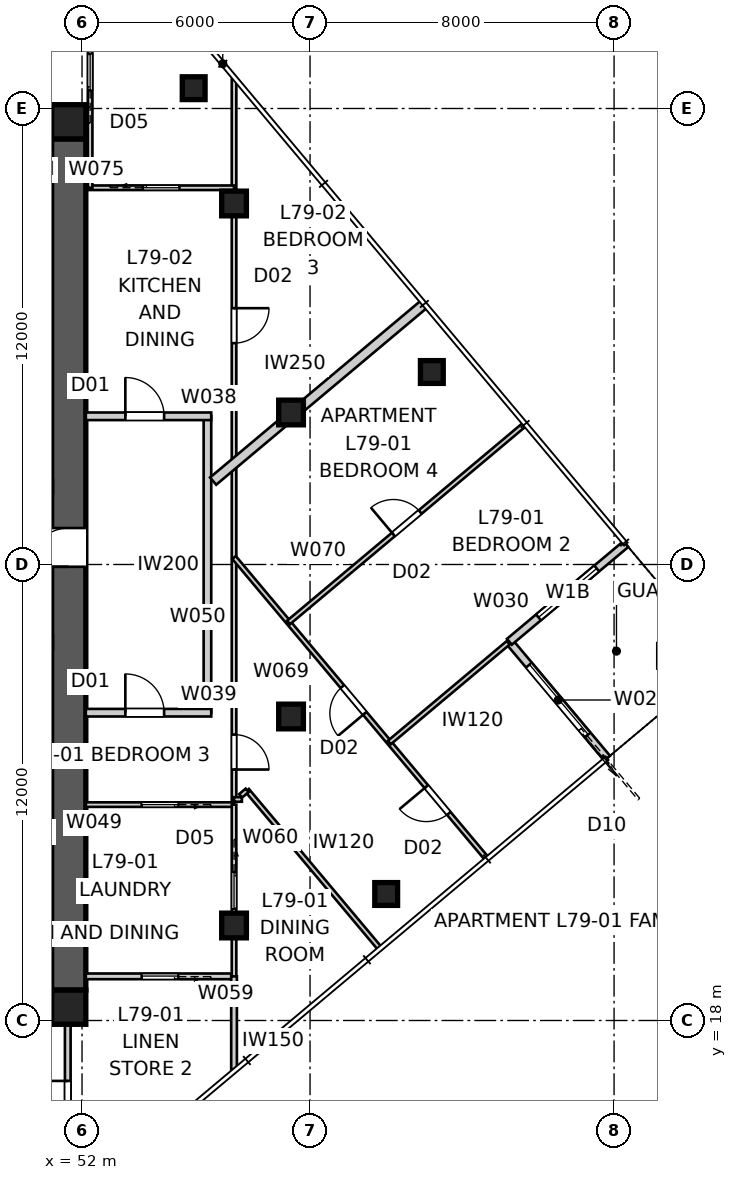
"""IFC4 building model, lengths in metres.
Left out: names, types, materials, properties, quantities, classifications, styles, units other than length and angle.
Written with IfcOpenShell. Run it as: python <this file> out.ifc"""

import sys

from ifc_helpers import new_model, si_unit, direction, frame, frame_2d, origin, origin_2d, place, context, subcontext, project, spatial, polyline, rectangle, outline, extrude, element, fill, save


model = new_model("IFC4")
c1 = context("Model", 3, precision=1e-05, world=origin(), true_north=direction((0.0, 1.0)))
c2 = subcontext(c1, "Body", "Model", "MODEL_VIEW")
j1 = project(units=[si_unit("LENGTHUNIT", "METRE"), si_unit("PLANEANGLEUNIT", "RADIAN")], contexts=[c1])
p1 = place(None, origin())
s1 = spatial("IfcSite", under=j1, at=p1, CompositionType="ELEMENT")
p2 = place(p1, origin())
s2 = spatial("IfcBuilding", under=s1, at=p2, CompositionType="ELEMENT")
p3 = place(p2, frame((0.0, 0.0, 286.2)))
s3 = spatial("IfcBuildingStorey", under=s2, at=p3, CompositionType="ELEMENT", Elevation=286.2)
for number, where, z_axis, x_axis in (
    (1, (28.8, 41.65, 0.0), (0.0, 0.0, 1.0), (1.0, 0.0, 0.0)),
    (2, (51.2, 18.35, 0.0), (0.0, 0.0, 1.0), (-1.0, 0.0, 0.0)),
):
    element("IfcWall", number, at=place(p3, frame(where, z_axis=z_axis, x_axis=x_axis)), inside=s3, PredefinedType="SHEAR", context=c2, shape_type="SweptSolid", body=[
        extrude(outline(polyline([(0.0, -0.45), (22.4, -0.45), (22.4, -0.025), (22.85, -0.025), (22.85, 0.025), (22.4, 0.025), (22.4, 0.45), (0.0, 0.45), (0.0, 0.025), (-0.45, 0.025), (-0.45, -0.025), (0.0, -0.025), (0.0, -0.45)])), origin(), (0.0, 0.0, 1.0), 3.4),
    ])
p4 = place(p3, frame((51.65, 18.8, 0.0), z_axis=(0.0, 0.0, 1.0), x_axis=(0.0, 1.0, 0.0)))
e3 = element("IfcWall", 3, at=p4, inside=s3, PredefinedType="SHEAR", context=c2, shape_type="SweptSolid", body=[
    extrude(outline(polyline([(0.0, -0.45), (22.4, -0.45), (22.4, -0.025), (22.85, -0.025), (22.85, 0.025), (22.4, 0.025), (22.4, 0.45), (0.0, 0.45), (0.0, 0.025), (-0.45, 0.025), (-0.45, -0.025), (0.0, -0.025), (0.0, -0.45)])), origin(), (0.0, 0.0, 1.0), 3.4),
])
p5 = place(p4, frame((11.14, 0.0, 0.0)))
e4 = element("IfcOpeningElement", 4, at=p5, cuts=e3, PredefinedType="OPENING", context=c2, shape_type="SweptSolid", body=[
    extrude(rectangle(XDim=1.02, YDim=2.4, at=frame_2d((0.51, 1.2))), frame((0.0, 0.46, 0.0), z_axis=(0.0, -1.0, 0.0), x_axis=(1.0, 0.0, 0.0)), (0.0, 0.0, 1.0), 0.92),
])
for number, where, z_axis, x_axis in (
    (5, (51.65, 18.35, 0.0), (0.0, 0.0, 1.0), (1.0, 0.0, 0.0)),
    (6, (51.65, 41.65, 0.0), (0.0, 0.0, 1.0), (1.0, 0.0, 0.0)),
):
    element("IfcColumn", number, at=place(p3, frame(where, z_axis=z_axis, x_axis=x_axis)), inside=s3, PredefinedType="COLUMN", context=c2, shape_type="SweptSolid", body=[
        extrude(rectangle(XDim=0.9, YDim=0.9, at=origin_2d()), origin(), (0.0, 0.0, 1.0), 3.4),
    ])
for number, where, z_axis, x_axis in (
    (7, (60.003, 21.329, 0.0), (0.0, 0.0, 1.0), (1.0, 0.0, 0.0)),
    (8, (61.205, 35.065, 0.0), (0.0, 0.0, 1.0), (1.0, 0.0, 0.0)),
    (9, (54.938, 42.534, 0.0), (0.0, 0.0, 1.0), (1.0, 0.0, 0.0)),
):
    element("IfcColumn", number, at=place(p3, frame(where, z_axis=z_axis, x_axis=x_axis)), inside=s3, PredefinedType="COLUMN", context=c2, shape_type="SweptSolid", body=[
        extrude(rectangle(XDim=0.6, YDim=0.6, at=origin_2d()), origin(), (0.0, 0.0, 1.0), 3.4),
    ])
for number, where, z_axis, x_axis in (
    (10, (57.5, 26.0, 0.0), (0.0, 0.0, 1.0), (1.0, 0.0, 0.0)),
    (11, (57.5, 34.0, 0.0), (0.0, 0.0, 1.0), (1.0, 0.0, 0.0)),
    (12, (56.0, 39.5, 0.0), (0.0, 0.0, 1.0), (1.0, 0.0, 0.0)),
    (13, (56.0, 20.5, 0.0), (0.0, 0.0, 1.0), (1.0, 0.0, 0.0)),
):
    element("IfcColumn", number, at=place(p3, frame(where, z_axis=z_axis, x_axis=x_axis)), inside=s3, PredefinedType="COLUMN", context=c2, shape_type="SweptSolid", body=[
        extrude(rectangle(XDim=0.65, YDim=0.65, at=origin_2d()), origin(), (0.0, 0.0, 1.0), 3.4),
    ])
p6 = place(p3, frame((65.817, 24.902, 0.0), z_axis=(0.0, 0.0, 1.0), x_axis=(-0.642768287094, 0.766060656284, 0.0)))
e14 = element("IfcWall", 14, at=p6, inside=s3, PredefinedType="SOLIDWALL", context=c2, shape_type="SweptSolid", body=[
    extrude(rectangle(XDim=4.0, YDim=0.2, at=frame_2d((2.0, 0.0))), origin(), (0.0, 0.0, 1.0), 3.25),
])
p7 = place(p6, frame((0.8, 0.0, 0.0)))
e15 = element("IfcOpeningElement", 15, at=p7, cuts=e14, PredefinedType="OPENING", context=c2, shape_type="SweptSolid", body=[
    extrude(rectangle(XDim=2.4, YDim=2.4, at=frame_2d((1.2, 1.2))), frame((0.0, 0.11, 0.0), z_axis=(0.0, -1.0, 0.0), x_axis=(1.0, 0.0, 0.0)), (0.0, 0.0, 1.0), 0.22),
])
p8 = place(p3, frame((63.246, 27.966, 0.0), z_axis=(0.0, 0.0, 1.0), x_axis=(0.766035437498, 0.642798342015, 0.0)))
e16 = element("IfcWall", 16, at=p8, inside=s3, PredefinedType="SOLIDWALL", context=c2, shape_type="SweptSolid", body=[
    extrude(rectangle(XDim=4.0, YDim=0.2, at=frame_2d((2.0, 0.0))), origin(), (0.0, 0.0, 1.0), 3.25),
])
p9 = place(p8, frame((1.0, 0.0, 0.45)))
e17 = element("IfcOpeningElement", 17, at=p9, cuts=e16, PredefinedType="OPENING", context=c2, shape_type="SweptSolid", body=[
    extrude(rectangle(XDim=2.0, YDim=1.8, at=frame_2d((1.0, 0.9))), frame((0.0, 0.11, 0.0), z_axis=(0.0, -1.0, 0.0), x_axis=(1.0, 0.0, 0.0)), (0.0, 0.0, 1.0), 0.22),
])
p10 = place(p3, frame((55.3, 26.1, 0.0), z_axis=(0.0, 0.0, 1.0), x_axis=(0.0, 1.0, 0.0)))
e18 = element("IfcWall", 18, at=p10, inside=s3, PredefinedType="PARTITIONING", context=c2, shape_type="SweptSolid", body=[
    extrude(rectangle(XDim=7.8, YDim=0.2, at=frame_2d((3.9, 0.0))), origin(), (0.0, 0.0, 1.0), 3.25),
])
p11 = place(p3, frame((52.1, 33.9, 0.0), z_axis=(0.0, 0.0, 1.0), x_axis=(1.0, 0.0, 0.0)))
e19 = element("IfcWall", 19, at=p11, inside=s3, PredefinedType="PARTITIONING", context=c2, shape_type="SweptSolid", body=[
    extrude(rectangle(XDim=3.3, YDim=0.2, at=frame_2d((1.65, 0.0))), origin(), (0.0, 0.0, 1.0), 3.25),
])
p12 = place(p11, frame((1.04, 0.0, 0.0)))
e20 = element("IfcOpeningElement", 20, at=p12, cuts=e19, PredefinedType="OPENING", context=c2, shape_type="SweptSolid", body=[
    extrude(rectangle(XDim=1.02, YDim=2.34, at=frame_2d((0.51, 1.17))), frame((0.0, 0.11, 0.0), z_axis=(0.0, -1.0, 0.0), x_axis=(1.0, 0.0, 0.0)), (0.0, 0.0, 1.0), 0.22),
])
p13 = place(p3, frame((52.1, 26.1, 0.0), z_axis=(0.0, 0.0, 1.0), x_axis=(1.0, 0.0, 0.0)))
e21 = element("IfcWall", 21, at=p13, inside=s3, PredefinedType="PARTITIONING", context=c2, shape_type="SweptSolid", body=[
    extrude(rectangle(XDim=3.3, YDim=0.2, at=frame_2d((1.65, 0.0))), origin(), (0.0, 0.0, 1.0), 3.25),
])
p14 = place(p13, frame((1.04, 0.0, 0.0)))
e22 = element("IfcOpeningElement", 22, at=p14, cuts=e21, PredefinedType="OPENING", context=c2, shape_type="SweptSolid", body=[
    extrude(rectangle(XDim=1.02, YDim=2.34, at=frame_2d((0.51, 1.17))), frame((0.0, 0.11, 0.0), z_axis=(0.0, -1.0, 0.0), x_axis=(1.0, 0.0, 0.0)), (0.0, 0.0, 1.0), 0.22),
])
p15 = place(p3, frame((61.007, 36.857, 0.0), z_axis=(0.0, 0.0, 1.0), x_axis=(-0.766054150891, -0.642776040237, 0.0)))
e23 = element("IfcWall", 23, at=p15, inside=s3, PredefinedType="PARTITIONING", context=c2, shape_type="SweptSolid", body=[
    extrude(rectangle(XDim=7.254, YDim=0.25, at=frame_2d((3.627, 0.0))), origin(), (0.0, 0.0, 1.0), 3.25),
])
p16 = place(p3, frame((56.0, 23.681, 0.0), z_axis=(0.0, 0.0, 1.0), x_axis=(-1.0, 0.0, 0.0)))
e24 = element("IfcWall", 24, at=p16, inside=s3, PredefinedType="PARTITIONING", context=c2, shape_type="SweptSolid", body=[
    extrude(rectangle(XDim=3.9, YDim=0.12, at=frame_2d((1.95, 0.0))), origin(), (0.0, 0.0, 1.0), 3.25),
])
p17 = place(p16, frame((1.47, 0.0, 0.0)))
e25 = element("IfcOpeningElement", 25, at=p17, cuts=e24, PredefinedType="OPENING", context=c2, shape_type="SweptSolid", body=[
    extrude(rectangle(XDim=0.96, YDim=2.1, at=frame_2d((0.48, 1.05))), frame((0.0, 0.07, 0.0), z_axis=(0.0, -1.0, 0.0), x_axis=(1.0, 0.0, 0.0)), (0.0, 0.0, 1.0), 0.14),
])
p18 = place(p3, frame((56.0, 42.762, 0.0), z_axis=(0.0, 0.0, 1.0), x_axis=(0.0, -1.0, 0.0)))
e26 = element("IfcWall", 26, at=p18, inside=s3, PredefinedType="PARTITIONING", context=c2, shape_type="SweptSolid", body=[
    extrude(rectangle(XDim=18.995, YDim=0.12, at=frame_2d((9.498, 0.0))), origin(), (0.0, 0.0, 1.0), 2.55),
])
p19 = place(p18, frame((17.238, 0.0, 0.0)))
e27 = element("IfcOpeningElement", 27, at=p19, cuts=e26, PredefinedType="OPENING", context=c2, shape_type="SweptSolid", body=[
    extrude(rectangle(XDim=0.92, YDim=2.34, at=frame_2d((0.46, 1.17))), frame((0.0, 0.07, 0.0), z_axis=(0.0, -1.0, 0.0), x_axis=(1.0, 0.0, 0.0)), (0.0, 0.0, 1.0), 0.14),
])
p20 = place(p18, frame((6.017, 0.0, 0.0)))
e28 = element("IfcOpeningElement", 28, at=p20, cuts=e26, PredefinedType="OPENING", context=c2, shape_type="SweptSolid", body=[
    extrude(rectangle(XDim=0.92, YDim=2.34, at=frame_2d((0.46, 1.17))), frame((0.0, 0.07, 0.0), z_axis=(0.0, -1.0, 0.0), x_axis=(1.0, 0.0, 0.0)), (0.0, 0.0, 1.0), 0.14),
])
p21 = place(p3, frame((56.0, 19.162, 0.0), z_axis=(0.0, 0.0, 1.0), x_axis=(-1.0, 0.0, 0.0)))
e29 = element("IfcWall", 29, at=p21, inside=s3, PredefinedType="SOLIDWALL", context=c2, shape_type="SweptSolid", body=[
    extrude(rectangle(XDim=3.9, YDim=0.15, at=frame_2d((1.95, 0.0))), origin(), (0.0, 0.0, 1.0), 3.25),
])
p22 = place(p21, frame((1.47, 0.0, 0.0)))
e30 = element("IfcOpeningElement", 30, at=p22, cuts=e29, PredefinedType="OPENING", context=c2, shape_type="SweptSolid", body=[
    extrude(rectangle(XDim=0.96, YDim=2.1, at=frame_2d((0.48, 1.05))), frame((0.0, 0.085, 0.0), z_axis=(0.0, -1.0, 0.0), x_axis=(1.0, 0.0, 0.0)), (0.0, 0.0, 1.0), 0.17),
])
p23 = place(p3, frame((56.0, 23.681, 0.0), z_axis=(0.0, 0.0, 1.0), x_axis=(0.0, -1.0, 0.0)))
e31 = element("IfcWall", 31, at=p23, inside=s3, PredefinedType="PARTITIONING", context=c2, shape_type="SweptSolid", body=[
    extrude(rectangle(XDim=4.519, YDim=0.12, at=frame_2d((2.26, 0.0))), origin(), (0.0, 0.0, 1.0), 2.55),
])
p24 = place(p23, frame((1.78, 0.0, 0.0)))
e32 = element("IfcOpeningElement", 32, at=p24, cuts=e31, PredefinedType="OPENING", context=c2, shape_type="SweptSolid", body=[
    extrude(rectangle(XDim=0.96, YDim=2.1, at=frame_2d((0.48, 1.05))), frame((0.0, 0.07, 0.0), z_axis=(0.0, -1.0, 0.0), x_axis=(1.0, 0.0, 0.0)), (0.0, 0.0, 1.0), 0.14),
])
p25 = place(p3, frame((51.625, 14.0, 0.0), z_axis=(0.0, 0.0, 1.0), x_axis=(0.0, 1.0, 0.0)))
e33 = element("IfcWall", 33, at=p25, inside=s3, PredefinedType="SOLIDWALL", context=c2, shape_type="SweptSolid", body=[
    extrude(rectangle(XDim=3.9, YDim=0.15, at=frame_2d((1.95, 0.0))), origin(), (0.0, 0.0, 1.0), 3.25),
])
p26 = place(p25, frame((1.49, 0.0, 0.0)))
e34 = element("IfcOpeningElement", 34, at=p26, cuts=e33, PredefinedType="OPENING", context=c2, shape_type="SweptSolid", body=[
    extrude(rectangle(XDim=0.92, YDim=2.1, at=frame_2d((0.46, 1.05))), frame((0.0, 0.085, 0.0), z_axis=(0.0, -1.0, 0.0), x_axis=(1.0, 0.0, 0.0)), (0.0, 0.0, 1.0), 0.17),
])
p27 = place(p3, frame((56.0, 19.162, 0.0), z_axis=(0.0, 0.0, 1.0), x_axis=(0.0, -1.0, 0.0)))
e35 = element("IfcWall", 35, at=p27, inside=s3, PredefinedType="SOLIDWALL", context=c2, shape_type="SweptSolid", body=[
    extrude(rectangle(XDim=2.445, YDim=0.15, at=frame_2d((1.222, 0.0))), origin(), (0.0, 0.0, 1.0), 3.25),
])
p28 = place(p3, frame((62.631, 22.281, 0.0), z_axis=(0.0, 0.0, 1.0), x_axis=(-0.64277851249, 0.766052076481, 0.0)))
e36 = element("IfcWall", 36, at=p28, inside=s3, PredefinedType="PARTITIONING", context=c2, shape_type="SweptSolid", body=[
    extrude(rectangle(XDim=10.316, YDim=0.12, at=frame_2d((5.158, 0.0))), origin(), (0.0, 0.0, 1.0), 3.25),
])
p29 = place(p28, frame((4.962, 0.0, 0.0)))
e37 = element("IfcOpeningElement", 37, at=p29, cuts=e36, PredefinedType="OPENING", context=c2, shape_type="SweptSolid", body=[
    extrude(rectangle(XDim=0.92, YDim=2.34, at=frame_2d((0.46, 1.17))), frame((0.0, 0.07, 0.0), z_axis=(0.0, -1.0, 0.0), x_axis=(1.0, 0.0, 0.0)), (0.0, 0.0, 1.0), 0.14),
])
p30 = place(p28, frame((1.525, 0.0, 0.0)))
e38 = element("IfcOpeningElement", 38, at=p30, cuts=e36, PredefinedType="OPENING", context=c2, shape_type="SweptSolid", body=[
    extrude(rectangle(XDim=0.92, YDim=2.34, at=frame_2d((0.46, 1.17))), frame((0.0, 0.07, 0.0), z_axis=(0.0, -1.0, 0.0), x_axis=(1.0, 0.0, 0.0)), (0.0, 0.0, 1.0), 0.14),
])
p31 = place(p3, frame((57.434, 28.475, 0.0), z_axis=(0.0, 0.0, 1.0), x_axis=(0.766033729027, 0.642800378028, 0.0)))
e39 = element("IfcWall", 39, at=p31, inside=s3, PredefinedType="PARTITIONING", context=c2, shape_type="SweptSolid", body=[
    extrude(rectangle(XDim=8.085, YDim=0.12, at=frame_2d((4.042, 0.0))), origin(), (0.0, 0.0, 1.0), 3.25),
])
p32 = place(p31, frame((3.603, 0.0, 0.0)))
e40 = element("IfcOpeningElement", 40, at=p32, cuts=e39, PredefinedType="OPENING", context=c2, shape_type="SweptSolid", body=[
    extrude(rectangle(XDim=0.92, YDim=2.34, at=frame_2d((0.46, 1.17))), frame((0.0, 0.07, 0.0), z_axis=(0.0, -1.0, 0.0), x_axis=(1.0, 0.0, 0.0)), (0.0, 0.0, 1.0), 0.14),
])
p33 = place(p3, frame((63.215, 27.94, 0.0), z_axis=(0.0, 0.0, 1.0), x_axis=(-0.766036790562, -0.642796729538, 0.0)))
e41 = element("IfcWall", 41, at=p33, inside=s3, PredefinedType="PARTITIONING", context=c2, shape_type="SweptSolid", body=[
    extrude(rectangle(XDim=4.085, YDim=0.12, at=frame_2d((2.042, 0.0))), origin(), (0.0, 0.0, 1.0), 3.25),
])
p34 = place(p3, frame((59.816, 19.919, 0.0), z_axis=(0.0, 0.0, 1.0), x_axis=(-0.642773197476, 0.766056536168, 0.0)))
e42 = element("IfcWall", 42, at=p34, inside=s3, PredefinedType="PARTITIONING", context=c2, shape_type="SweptSolid", body=[
    extrude(rectangle(XDim=5.4, YDim=0.12, at=frame_2d((2.7, 0.0))), origin(), (0.0, 0.0, 1.0), 3.25),
])
p35 = place(p3, frame((56.345, 24.056, 0.0), z_axis=(0.0, 0.0, 1.0), x_axis=(-0.766260492227, -0.642530044474, 0.0)))
e43 = element("IfcWall", 43, at=p35, inside=s3, PredefinedType="PARTITIONING", context=c2, shape_type="SweptSolid", body=[
    extrude(rectangle(XDim=0.225, YDim=0.12, at=frame_2d((0.112, 0.0))), origin(), (0.0, 0.0, 1.0), 3.25),
])
p36 = place(p3, frame((56.207, 23.817, 0.0), z_axis=(0.0, 0.0, 1.0), x_axis=(-1.0, 0.0, 0.0)))
e44 = element("IfcWall", 44, at=p36, inside=s3, PredefinedType="PARTITIONING", context=c2, shape_type="SweptSolid", body=[
    extrude(rectangle(XDim=0.207, YDim=0.12, at=frame_2d((0.104, 0.0))), origin(), (0.0, 0.0, 1.0), 3.25),
])
p37 = place(p3, frame((52.163, 39.914, 0.0), z_axis=(0.0, 0.0, 1.0), x_axis=(1.0, 0.0, 0.0)))
e45 = element("IfcWall", 45, at=p37, inside=s3, PredefinedType="PARTITIONING", context=c2, shape_type="SweptSolid", body=[
    extrude(rectangle(XDim=3.837, YDim=0.12, at=frame_2d((1.918, 0.0))), origin(), (0.0, 0.0, 1.0), 3.25),
])
p38 = place(p37, frame((1.438, 0.0, 0.0)))
e46 = element("IfcOpeningElement", 46, at=p38, cuts=e45, PredefinedType="OPENING", context=c2, shape_type="SweptSolid", body=[
    extrude(rectangle(XDim=0.96, YDim=2.1, at=frame_2d((0.48, 1.05))), frame((0.0, 0.07, 0.0), z_axis=(0.0, -1.0, 0.0), x_axis=(1.0, 0.0, 0.0)), (0.0, 0.0, 1.0), 0.14),
])
p39 = place(p3, frame((52.213, 39.914, 0.0), z_axis=(0.0, 0.0, 1.0), x_axis=(0.0, 1.0, 0.0)))
e47 = element("IfcWall", 47, at=p39, inside=s3, PredefinedType="PARTITIONING", context=c2, shape_type="SweptSolid", body=[
    extrude(rectangle(XDim=6.086, YDim=0.12, at=frame_2d((3.043, 0.0))), origin(), (0.0, 0.0, 1.0), 3.25),
])
p40 = place(p39, frame((2.563, 0.0, 0.0)))
e48 = element("IfcOpeningElement", 48, at=p40, cuts=e47, PredefinedType="OPENING", context=c2, shape_type="SweptSolid", body=[
    extrude(rectangle(XDim=0.96, YDim=2.1, at=frame_2d((0.48, 1.05))), frame((0.0, 0.07, 0.0), z_axis=(0.0, -1.0, 0.0), x_axis=(1.0, 0.0, 0.0)), (0.0, 0.0, 1.0), 0.14),
])
p41 = place(p3, frame((51.625, 17.9, 0.0), z_axis=(0.0, 0.0, 1.0), x_axis=(0.027925096799, 0.999610018442, 0.0)))
e49 = element("IfcWall", 49, at=p41, inside=s3, PredefinedType="SOLIDWALL", context=c2, shape_type="SweptSolid", body=[
    extrude(rectangle(XDim=0.9, YDim=0.15, at=frame_2d((0.45, 0.0))), origin(), (0.0, 0.0, 1.0), 3.25),
])
p42 = place(p7, origin())
e50 = element("IfcDoor", 50, at=p42, inside=s3, OperationType="SLIDING_TO_LEFT", PredefinedType="DOOR", context=c2, shape_type="SweptSolid", body=[
    extrude(rectangle(XDim=2.4, YDim=2.4, at=frame_2d((1.2, 1.2))), frame((0.0, 0.025, 0.0), z_axis=(0.0, -1.0, 0.0), x_axis=(1.0, 0.0, 0.0)), (0.0, 0.0, 1.0), 0.05),
])
fill(e15, e50)
p43 = place(p9, origin())
e51 = element("IfcWindow", 51, at=p43, inside=s3, PartitioningType="SINGLE_PANEL", PredefinedType="WINDOW", context=c2, shape_type="SweptSolid", body=[
    extrude(rectangle(XDim=2.0, YDim=1.8, at=frame_2d((1.0, 0.9))), frame((0.0, 0.03, 0.0), z_axis=(0.0, -1.0, 0.0), x_axis=(1.0, 0.0, 0.0)), (0.0, 0.0, 1.0), 0.06),
])
fill(e17, e51)
p44 = place(p14, origin())
e52 = element("IfcDoor", 52, at=p44, inside=s3, OperationType="SINGLE_SWING_LEFT", PredefinedType="DOOR", context=c2, shape_type="SweptSolid", body=[
    extrude(rectangle(XDim=1.02, YDim=2.34, at=frame_2d((0.51, 1.17))), frame((0.0, 0.025, 0.0), z_axis=(0.0, -1.0, 0.0), x_axis=(1.0, 0.0, 0.0)), (0.0, 0.0, 1.0), 0.05),
])
fill(e22, e52)
p45 = place(p12, origin())
e53 = element("IfcDoor", 53, at=p45, inside=s3, OperationType="SINGLE_SWING_LEFT", PredefinedType="DOOR", context=c2, shape_type="SweptSolid", body=[
    extrude(rectangle(XDim=1.02, YDim=2.34, at=frame_2d((0.51, 1.17))), frame((0.0, 0.025, 0.0), z_axis=(0.0, -1.0, 0.0), x_axis=(1.0, 0.0, 0.0)), (0.0, 0.0, 1.0), 0.05),
])
fill(e20, e53)
p46 = place(p19, origin())
e54 = element("IfcDoor", 54, at=p46, inside=s3, OperationType="SINGLE_SWING_RIGHT", PredefinedType="DOOR", context=c2, shape_type="SweptSolid", body=[
    extrude(rectangle(XDim=0.92, YDim=2.34, at=frame_2d((0.46, 1.17))), frame((0.0, 0.025, 0.0), z_axis=(0.0, -1.0, 0.0), x_axis=(1.0, 0.0, 0.0)), (0.0, 0.0, 1.0), 0.05),
])
fill(e27, e54)
p47 = place(p17, origin())
e55 = element("IfcDoor", 55, at=p47, inside=s3, OperationType="SLIDING_TO_LEFT", PredefinedType="DOOR", context=c2, shape_type="SweptSolid", body=[
    extrude(rectangle(XDim=0.96, YDim=2.1, at=frame_2d((0.48, 1.05))), frame((0.0, 0.025, 0.0), z_axis=(0.0, -1.0, 0.0), x_axis=(1.0, 0.0, 0.0)), (0.0, 0.0, 1.0), 0.05),
])
fill(e25, e55)
p48 = place(p20, origin())
e56 = element("IfcDoor", 56, at=p48, inside=s3, OperationType="SINGLE_SWING_LEFT", PredefinedType="DOOR", context=c2, shape_type="SweptSolid", body=[
    extrude(rectangle(XDim=0.92, YDim=2.34, at=frame_2d((0.46, 1.17))), frame((0.0, 0.025, 0.0), z_axis=(0.0, -1.0, 0.0), x_axis=(1.0, 0.0, 0.0)), (0.0, 0.0, 1.0), 0.05),
])
fill(e28, e56)
p49 = place(p38, origin())
e57 = element("IfcDoor", 57, at=p49, inside=s3, OperationType="SLIDING_TO_LEFT", PredefinedType="DOOR", context=c2, shape_type="SweptSolid", body=[
    extrude(rectangle(XDim=0.96, YDim=2.1, at=frame_2d((0.48, 1.05))), frame((0.0, 0.025, 0.0), z_axis=(0.0, -1.0, 0.0), x_axis=(1.0, 0.0, 0.0)), (0.0, 0.0, 1.0), 0.05),
])
fill(e46, e57)
p50 = place(p24, origin())
e58 = element("IfcDoor", 58, at=p50, inside=s3, OperationType="SLIDING_TO_LEFT", PredefinedType="DOOR", context=c2, shape_type="SweptSolid", body=[
    extrude(rectangle(XDim=0.96, YDim=2.1, at=frame_2d((0.48, 1.05))), frame((0.0, 0.025, 0.0), z_axis=(0.0, -1.0, 0.0), x_axis=(1.0, 0.0, 0.0)), (0.0, 0.0, 1.0), 0.05),
])
fill(e32, e58)
p51 = place(p22, origin())
e59 = element("IfcDoor", 59, at=p51, inside=s3, OperationType="SLIDING_TO_LEFT", PredefinedType="DOOR", context=c2, shape_type="SweptSolid", body=[
    extrude(rectangle(XDim=0.96, YDim=2.1, at=frame_2d((0.48, 1.05))), frame((0.0, 0.025, 0.0), z_axis=(0.0, -1.0, 0.0), x_axis=(1.0, 0.0, 0.0)), (0.0, 0.0, 1.0), 0.05),
])
fill(e30, e59)
p52 = place(p40, origin())
e60 = element("IfcDoor", 60, at=p52, inside=s3, OperationType="SLIDING_TO_LEFT", PredefinedType="DOOR", context=c2, shape_type="SweptSolid", body=[
    extrude(rectangle(XDim=0.96, YDim=2.1, at=frame_2d((0.48, 1.05))), frame((0.0, 0.025, 0.0), z_axis=(0.0, -1.0, 0.0), x_axis=(1.0, 0.0, 0.0)), (0.0, 0.0, 1.0), 0.05),
])
fill(e48, e60)
p53 = place(p26, origin())
e61 = element("IfcDoor", 61, at=p53, inside=s3, OperationType="SINGLE_SWING_RIGHT", PredefinedType="DOOR", context=c2, shape_type="SweptSolid", body=[
    extrude(rectangle(XDim=0.92, YDim=2.1, at=frame_2d((0.46, 1.05))), frame((0.0, 0.025, 0.0), z_axis=(0.0, -1.0, 0.0), x_axis=(1.0, 0.0, 0.0)), (0.0, 0.0, 1.0), 0.05),
])
fill(e34, e61)
p54 = place(p29, origin())
e62 = element("IfcDoor", 62, at=p54, inside=s3, OperationType="SINGLE_SWING_LEFT", PredefinedType="DOOR", context=c2, shape_type="SweptSolid", body=[
    extrude(rectangle(XDim=0.92, YDim=2.34, at=frame_2d((0.46, 1.17))), frame((0.0, 0.025, 0.0), z_axis=(0.0, -1.0, 0.0), x_axis=(1.0, 0.0, 0.0)), (0.0, 0.0, 1.0), 0.05),
])
fill(e37, e62)
p55 = place(p30, origin())
e63 = element("IfcDoor", 63, at=p55, inside=s3, OperationType="SINGLE_SWING_RIGHT", PredefinedType="DOOR", context=c2, shape_type="SweptSolid", body=[
    extrude(rectangle(XDim=0.92, YDim=2.34, at=frame_2d((0.46, 1.17))), frame((0.0, 0.025, 0.0), z_axis=(0.0, -1.0, 0.0), x_axis=(1.0, 0.0, 0.0)), (0.0, 0.0, 1.0), 0.05),
])
fill(e38, e63)
p56 = place(p32, origin())
e64 = element("IfcDoor", 64, at=p56, inside=s3, OperationType="SINGLE_SWING_LEFT", PredefinedType="DOOR", context=c2, shape_type="SweptSolid", body=[
    extrude(rectangle(XDim=0.92, YDim=2.34, at=frame_2d((0.46, 1.17))), frame((0.0, 0.025, 0.0), z_axis=(0.0, -1.0, 0.0), x_axis=(1.0, 0.0, 0.0)), (0.0, 0.0, 1.0), 0.05),
])
fill(e40, e64)
p57 = place(p5, origin())
e65 = element("IfcDoor", 65, at=p57, inside=s3, OperationType="SINGLE_SWING_LEFT", PredefinedType="DOOR", context=c2, shape_type="SweptSolid", body=[
    extrude(rectangle(XDim=1.02, YDim=2.4, at=frame_2d((0.51, 1.2))), frame((0.0, 0.025, 0.0), z_axis=(0.0, -1.0, 0.0), x_axis=(1.0, 0.0, 0.0)), (0.0, 0.0, 1.0), 0.05),
])
fill(e4, e65)
save(model, sys.argv[1])
